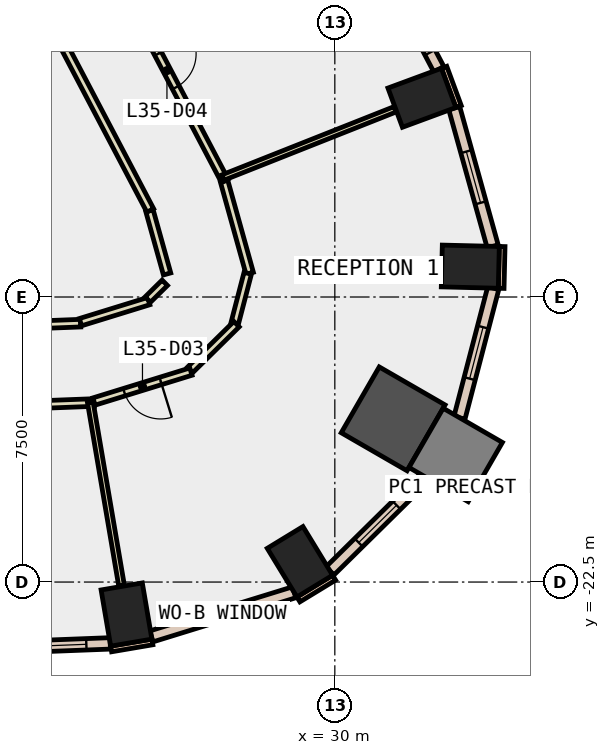
"""IFC4 building model, lengths in metres.
Left out: names, types, materials, properties, quantities, classifications, styles, units other than length and angle.
Written with IfcOpenShell. Run it as: python <this file> out.ifc"""

import sys

from ifc_helpers import new_model, si_unit, direction, frame, frame_2d, origin, origin_2d, place, context, subcontext, project, spatial, rectangle, extrude, element, fill, save


model = new_model("IFC4")
c1 = context("Model", 3, precision=1e-05, world=origin(), true_north=direction((0.0, 1.0)))
c2 = subcontext(c1, "Body", "Model", "MODEL_VIEW")
j1 = project(units=[si_unit("LENGTHUNIT", "METRE"), si_unit("PLANEANGLEUNIT", "RADIAN")], contexts=[c1])
p1 = place(None, origin())
s1 = spatial("IfcSite", under=j1, at=p1, CompositionType="ELEMENT")
p2 = place(p1, origin())
s2 = spatial("IfcBuilding", under=s1, at=p2, CompositionType="ELEMENT")
p3 = place(p2, frame((0.0, 0.0, 159.2)))
s3 = spatial("IfcBuildingStorey", under=s2, at=p3, CompositionType="ELEMENT", Elevation=159.2)
for number, where, z_axis, x_axis in (
    (1, (24.518, -23.355, -0.4), (0.0, 0.0, 1.0), (0.986, 0.168, 0.0)),
    (2, (29.082, -21.967, -0.4), (0.0, 0.0, 1.0), (0.854, 0.521, 0.0)),
):
    element("IfcColumn", number, at=place(p3, frame(where, z_axis=z_axis, x_axis=x_axis)), inside=s3, PredefinedType="COLUMN", context=c2, shape_type="SweptSolid", body=[
        extrude(rectangle(XDim=1.1, YDim=1.5, at=origin_2d()), origin(), (0.0, 0.0, 1.0), 4.2),
    ])
p4 = place(p3, frame((31.535, -18.206, -0.4), z_axis=(0.0, 0.0, 1.0), x_axis=(-0.866025403784, 0.5, 0.0)))
e3 = element("IfcColumn", 3, at=p4, inside=s3, PredefinedType="COLUMN", context=c2, shape_type="SweptSolid", body=[
    extrude(rectangle(XDim=2.0, YDim=2.0, at=origin_2d()), origin(), (0.0, 0.0, 1.0), 4.2),
])
for number, where, z_axis, x_axis in (
    (4, (33.565, -14.202, -0.4), (0.0, 0.0, 1.0), (0.024, 1.0, 0.0)),
    (5, (32.292, -9.758, -0.4), (0.0, 0.0, 1.0), (-0.347, 0.938, 0.0)),
):
    element("IfcColumn", number, at=place(p3, frame(where, z_axis=z_axis, x_axis=x_axis)), inside=s3, PredefinedType="COLUMN", context=c2, shape_type="SweptSolid", body=[
        extrude(rectangle(XDim=1.1, YDim=1.5, at=origin_2d()), origin(), (0.0, 0.0, 1.0), 4.2),
    ])
p5 = place(p3, frame((33.18, -19.156, -0.4), z_axis=(0.0, 0.0, 1.0), x_axis=(-0.866025403784, 0.5, 0.0)))
e6 = element("IfcColumn", 6, at=p5, inside=s3, PredefinedType="COLUMN", context=c2, shape_type="SweptSolid", body=[
    extrude(rectangle(XDim=1.8, YDim=1.8, at=origin_2d()), origin(), (0.0, 0.0, 1.0), 4.2),
])
p6 = place(p3, frame((33.256, -9.988, 0.0), z_axis=(0.0, 0.0, 1.0), x_axis=(-0.346425160624, 0.93807761304, 0.0)))
e7 = element("IfcWall", 7, at=p6, inside=s3, PredefinedType="STANDARD", context=c2, shape_type="SweptSolid", body=[
    extrude(rectangle(XDim=1.1, YDim=0.15, at=frame_2d((0.55, 0.0))), origin(), (0.0, 0.0, 1.0), 3.8),
])
p7 = place(p3, frame((24.114, -24.261, 0.0), z_axis=(0.0, 0.0, 1.0), x_axis=(0.985763338892, 0.168138751323, 0.0)))
e8 = element("IfcWall", 8, at=p7, inside=s3, PredefinedType="STANDARD", context=c2, shape_type="SweptSolid", body=[
    extrude(rectangle(XDim=1.101, YDim=0.15, at=frame_2d((0.55, 0.0))), origin(), (0.0, 0.0, 1.0), 3.8),
])
p8 = place(p3, frame((29.042, -22.957, 0.0), z_axis=(0.0, 0.0, 1.0), x_axis=(0.854005542721, 0.520263907071, 0.0)))
e9 = element("IfcWall", 9, at=p8, inside=s3, PredefinedType="STANDARD", context=c2, shape_type="SweptSolid", body=[
    extrude(rectangle(XDim=1.099, YDim=0.15, at=frame_2d((0.55, 0.0))), origin(), (0.0, 0.0, 1.0), 3.8),
])
p9 = place(p3, frame((34.377, -14.772, 0.0), z_axis=(0.0, 0.0, 1.0), x_axis=(0.023744690764, 0.999718055084, 0.0)))
e10 = element("IfcWall", 10, at=p9, inside=s3, PredefinedType="STANDARD", context=c2, shape_type="SweptSolid", body=[
    extrude(rectangle(XDim=1.1, YDim=0.15, at=frame_2d((0.55, 0.0))), origin(), (0.0, 0.0, 1.0), 3.8),
])
p10 = place(p3, frame((16.778, -24.395, 0.0), z_axis=(0.0, 0.0, 1.0), x_axis=(0.999262356942, 0.038402369711, 0.0)))
e11 = element("IfcWall", 11, at=p10, inside=s3, PredefinedType="STANDARD", context=c2, shape_type="SweptSolid", body=[
    extrude(rectangle(XDim=7.317, YDim=0.3, at=frame_2d((3.659, 0.0))), origin(), (0.0, 0.0, 1.0), 3.8),
])
p11 = place(p10, frame((0.629, 0.0, 0.9)))
e12 = element("IfcOpeningElement", 12, at=p11, cuts=e11, PredefinedType="OPENING", context=c2, shape_type="SweptSolid", body=[
    extrude(rectangle(XDim=2.4, YDim=2.6, at=frame_2d((1.2, 1.3))), frame((0.0, 0.16, 0.0), z_axis=(0.0, -1.0, 0.0), x_axis=(1.0, 0.0, 0.0)), (0.0, 0.0, 1.0), 0.32),
])
p12 = place(p10, frame((4.288, 0.0, 0.9)))
e13 = element("IfcOpeningElement", 13, at=p12, cuts=e11, PredefinedType="OPENING", context=c2, shape_type="SweptSolid", body=[
    extrude(rectangle(XDim=2.4, YDim=2.6, at=frame_2d((1.2, 1.3))), frame((0.0, 0.16, 0.0), z_axis=(0.0, -1.0, 0.0), x_axis=(1.0, 0.0, 0.0)), (0.0, 0.0, 1.0), 0.32),
])
p13 = place(p3, frame((25.173, -23.93, 0.0), z_axis=(0.0, 0.0, 1.0), x_axis=(0.955473661147, 0.295076401723, 0.0)))
e14 = element("IfcWall", 14, at=p13, inside=s3, PredefinedType="STANDARD", context=c2, shape_type="SweptSolid", body=[
    extrude(rectangle(XDim=3.931, YDim=0.3, at=frame_2d((1.965, 0.0))), origin(), (0.0, 0.0, 1.0), 3.8),
])
p14 = place(p13, frame((1.266, 0.0, 0.9)))
e15 = element("IfcOpeningElement", 15, at=p14, cuts=e14, PredefinedType="OPENING", context=c2, shape_type="SweptSolid", body=[
    extrude(rectangle(XDim=1.4, YDim=2.6, at=frame_2d((0.7, 1.3))), frame((0.0, 0.16, 0.0), z_axis=(0.0, -1.0, 0.0), x_axis=(1.0, 0.0, 0.0)), (0.0, 0.0, 1.0), 0.32),
])
p15 = place(p3, frame((29.872, -22.207, 0.0), z_axis=(0.0, 0.0, 1.0), x_axis=(0.712043314899, 0.702135540838, 0.0)))
e16 = element("IfcWall", 16, at=p15, inside=s3, PredefinedType="STANDARD", context=c2, shape_type="SweptSolid", body=[
    extrude(rectangle(XDim=3.524, YDim=0.3, at=frame_2d((1.762, 0.0))), origin(), (0.0, 0.0, 1.0), 3.8),
])
p16 = place(p15, frame((1.062, 0.0, 0.9)))
e17 = element("IfcOpeningElement", 17, at=p16, cuts=e16, PredefinedType="OPENING", context=c2, shape_type="SweptSolid", body=[
    extrude(rectangle(XDim=1.4, YDim=2.6, at=frame_2d((0.7, 1.3))), frame((0.0, 0.16, 0.0), z_axis=(0.0, -1.0, 0.0), x_axis=(1.0, 0.0, 0.0)), (0.0, 0.0, 1.0), 0.32),
])
p17 = place(p3, frame((33.28, -18.176, 0.0), z_axis=(0.0, 0.0, 1.0), x_axis=(0.252255494168, 0.967660666588, 0.0)))
e18 = element("IfcWall", 18, at=p17, inside=s3, PredefinedType="STANDARD", context=c2, shape_type="SweptSolid", body=[
    extrude(rectangle(XDim=3.524, YDim=0.3, at=frame_2d((1.762, 0.0))), origin(), (0.0, 0.0, 1.0), 3.8),
])
p18 = place(p17, frame((1.062, 0.0, 0.9)))
e19 = element("IfcOpeningElement", 19, at=p18, cuts=e18, PredefinedType="OPENING", context=c2, shape_type="SweptSolid", body=[
    extrude(rectangle(XDim=1.4, YDim=2.6, at=frame_2d((0.7, 1.3))), frame((0.0, 0.16, 0.0), z_axis=(0.0, -1.0, 0.0), x_axis=(1.0, 0.0, 0.0)), (0.0, 0.0, 1.0), 0.32),
])
p19 = place(p3, frame((34.154, -13.667, 0.0), z_axis=(0.0, 0.0, 1.0), x_axis=(-0.26799398221, 0.963420585985, 0.0)))
e20 = element("IfcWall", 20, at=p19, inside=s3, PredefinedType="STANDARD", context=c2, shape_type="SweptSolid", body=[
    extrude(rectangle(XDim=3.776, YDim=0.3, at=frame_2d((1.888, 0.0))), origin(), (0.0, 0.0, 1.0), 3.8),
])
p20 = place(p19, frame((1.188, 0.0, 0.9)))
e21 = element("IfcOpeningElement", 21, at=p20, cuts=e20, PredefinedType="OPENING", context=c2, shape_type="SweptSolid", body=[
    extrude(rectangle(XDim=1.4, YDim=2.6, at=frame_2d((0.7, 1.3))), frame((0.0, 0.16, 0.0), z_axis=(0.0, -1.0, 0.0), x_axis=(1.0, 0.0, 0.0)), (0.0, 0.0, 1.0), 0.32),
])
p21 = place(p3, frame((32.737, -9.008, 0.0), z_axis=(0.0, 0.0, 1.0), x_axis=(-0.465104650407, 0.885255705528, 0.0)))
e22 = element("IfcWall", 22, at=p21, inside=s3, PredefinedType="STANDARD", context=c2, shape_type="SweptSolid", body=[
    extrude(rectangle(XDim=5.99, YDim=0.3, at=frame_2d((2.995, 0.0))), origin(), (0.0, 0.0, 1.0), 3.8),
])
p22 = place(p21, frame((0.498, 0.0, 0.9)))
e23 = element("IfcOpeningElement", 23, at=p22, cuts=e22, PredefinedType="OPENING", context=c2, shape_type="SweptSolid", body=[
    extrude(rectangle(XDim=2.0, YDim=2.6, at=frame_2d((1.0, 1.3))), frame((0.0, 0.16, 0.0), z_axis=(0.0, -1.0, 0.0), x_axis=(1.0, 0.0, 0.0)), (0.0, 0.0, 1.0), 0.32),
])
p23 = place(p21, frame((3.493, 0.0, 0.9)))
e24 = element("IfcOpeningElement", 24, at=p23, cuts=e22, PredefinedType="OPENING", context=c2, shape_type="SweptSolid", body=[
    extrude(rectangle(XDim=2.0, YDim=2.6, at=frame_2d((1.0, 1.3))), frame((0.0, 0.16, 0.0), z_axis=(0.0, -1.0, 0.0), x_axis=(1.0, 0.0, 0.0)), (0.0, 0.0, 1.0), 0.32),
])
p24 = place(p3, frame((15.972, -15.97, 0.0), z_axis=(0.0, 0.0, 1.0), x_axis=(0.999262695969, 0.038393546916, 0.0)))
e25 = element("IfcWall", 25, at=p24, inside=s3, PredefinedType="PARTITIONING", context=c2, shape_type="SweptSolid", body=[
    extrude(rectangle(XDim=7.344, YDim=0.2, at=frame_2d((3.672, 0.0))), origin(), (0.0, 0.0, 1.0), 3.8),
])
p25 = place(p3, frame((23.307, -15.662, 0.0), z_axis=(0.0, 0.0, 1.0), x_axis=(0.955548436851, 0.294834164966, 0.0)))
e26 = element("IfcWall", 26, at=p25, inside=s3, PredefinedType="PARTITIONING", context=c2, shape_type="SweptSolid", body=[
    extrude(rectangle(XDim=1.88, YDim=0.2, at=frame_2d((0.94, 0.0))), origin(), (0.0, 0.0, 1.0), 3.8),
])
p26 = place(p3, frame((25.079, -15.067, 0.0), z_axis=(0.0, 0.0, 1.0), x_axis=(0.711758647644, 0.702424108003, 0.0)))
e27 = element("IfcWall", 27, at=p26, inside=s3, PredefinedType="PARTITIONING", context=c2, shape_type="SweptSolid", body=[
    extrude(rectangle(XDim=0.628, YDim=0.2, at=frame_2d((0.314, 0.0))), origin(), (0.0, 0.0, 1.0), 3.8),
])
p27 = place(p3, frame((25.586, -14.393, 0.0), z_axis=(0.0, 0.0, 1.0), x_axis=(-0.268139825244, 0.963380005044, 0.0)))
e28 = element("IfcWall", 28, at=p27, inside=s3, PredefinedType="PARTITIONING", context=c2, shape_type="SweptSolid", body=[
    extrude(rectangle(XDim=1.726, YDim=0.2, at=frame_2d((0.863, 0.0))), origin(), (0.0, 0.0, 1.0), 3.8),
])
p28 = place(p3, frame((25.143, -12.722, 0.0), z_axis=(0.0, 0.0, 1.0), x_axis=(-0.465089990515, 0.885263407536, 0.0)))
e29 = element("IfcWall", 29, at=p28, inside=s3, PredefinedType="PARTITIONING", context=c2, shape_type="SweptSolid", body=[
    extrude(rectangle(XDim=6.24, YDim=0.2, at=frame_2d((3.12, 0.0))), origin(), (0.0, 0.0, 1.0), 3.8),
])
p29 = place(p3, frame((23.667, -17.776, 0.0), z_axis=(0.0, 0.0, 1.0), x_axis=(-0.999264080977, -0.038357482575, 0.0)))
e30 = element("IfcWall", 30, at=p29, inside=s3, PredefinedType="PARTITIONING", context=c2, shape_type="SweptSolid", body=[
    extrude(rectangle(XDim=7.562, YDim=0.2, at=frame_2d((3.781, 0.0))), origin(), (0.0, 0.0, 1.0), 3.8),
])
p30 = place(p29, frame((3.356, 0.0, 0.0)))
e31 = element("IfcOpeningElement", 31, at=p30, cuts=e30, PredefinedType="OPENING", context=c2, shape_type="SweptSolid", body=[
    extrude(rectangle(XDim=1.0, YDim=2.1, at=frame_2d((0.5, 1.05))), frame((0.0, 0.11, 0.0), z_axis=(0.0, -1.0, 0.0), x_axis=(1.0, 0.0, 0.0)), (0.0, 0.0, 1.0), 0.22),
])
p31 = place(p3, frame((27.086, -11.952, 0.0), z_axis=(0.0, 0.0, 1.0), x_axis=(0.267909096687, -0.963444194498, 0.0)))
e32 = element("IfcWall", 32, at=p31, inside=s3, PredefinedType="PARTITIONING", context=c2, shape_type="SweptSolid", body=[
    extrude(rectangle(XDim=2.516, YDim=0.2, at=frame_2d((1.258, 0.0))), origin(), (0.0, 0.0, 1.0), 3.8),
])
p32 = place(p3, frame((27.708, -14.376, 0.0), z_axis=(0.0, 0.0, 1.0), x_axis=(-0.25159336549, -0.967833032316, 0.0)))
e33 = element("IfcWall", 33, at=p32, inside=s3, PredefinedType="PARTITIONING", context=c2, shape_type="SweptSolid", body=[
    extrude(rectangle(XDim=1.356, YDim=0.2, at=frame_2d((0.678, 0.0))), origin(), (0.0, 0.0, 1.0), 3.8),
])
p33 = place(p3, frame((27.413, -15.715, 0.0), z_axis=(0.0, 0.0, 1.0), x_axis=(-0.712339678389, -0.701834868465, 0.0)))
e34 = element("IfcWall", 34, at=p33, inside=s3, PredefinedType="PARTITIONING", context=c2, shape_type="SweptSolid", body=[
    extrude(rectangle(XDim=1.72, YDim=0.2, at=frame_2d((0.86, 0.0))), origin(), (0.0, 0.0, 1.0), 3.8),
])
p34 = place(p3, frame((26.213, -16.963, 0.0), z_axis=(0.0, 0.0, 1.0), x_axis=(-0.955509582123, -0.294960062501, 0.0)))
e35 = element("IfcWall", 35, at=p34, inside=s3, PredefinedType="PARTITIONING", context=c2, shape_type="SweptSolid", body=[
    extrude(rectangle(XDim=2.668, YDim=0.2, at=frame_2d((1.334, 0.0))), origin(), (0.0, 0.0, 1.0), 3.8),
])
p35 = place(p34, frame((0.834, 0.0, 0.0)))
e36 = element("IfcOpeningElement", 36, at=p35, cuts=e35, PredefinedType="OPENING", context=c2, shape_type="SweptSolid", body=[
    extrude(rectangle(XDim=1.0, YDim=2.1, at=frame_2d((0.5, 1.05))), frame((0.0, 0.11, 0.0), z_axis=(0.0, -1.0, 0.0), x_axis=(1.0, 0.0, 0.0)), (0.0, 0.0, 1.0), 0.22),
])
p36 = place(p3, frame((24.059, -6.143, 0.0), z_axis=(0.0, 0.0, 1.0), x_axis=(0.464993808059, -0.885313932154, 0.0)))
e37 = element("IfcWall", 37, at=p36, inside=s3, PredefinedType="PARTITIONING", context=c2, shape_type="SweptSolid", body=[
    extrude(rectangle(XDim=6.552, YDim=0.2, at=frame_2d((3.276, 0.0))), origin(), (0.0, 0.0, 1.0), 3.8),
])
p37 = place(p36, frame((2.776, 0.0, 0.0)))
e38 = element("IfcOpeningElement", 38, at=p37, cuts=e37, PredefinedType="OPENING", context=c2, shape_type="SweptSolid", body=[
    extrude(rectangle(XDim=1.0, YDim=2.1, at=frame_2d((0.5, 1.05))), frame((0.0, 0.11, 0.0), z_axis=(0.0, -1.0, 0.0), x_axis=(1.0, 0.0, 0.0)), (0.0, 0.0, 1.0), 0.22),
])
p38 = place(p3, frame((23.567, -17.779, 0.0), z_axis=(0.0, 0.0, 1.0), x_axis=(0.168027663896, -0.985782280306, 0.0)))
e39 = element("IfcWall", 39, at=p38, inside=s3, PredefinedType="PARTITIONING", context=c2, shape_type="SweptSolid", body=[
    extrude(rectangle(XDim=4.886, YDim=0.15, at=frame_2d((2.443, 0.0))), origin(), (0.0, 0.0, 1.0), 3.8),
])
p39 = place(p3, frame((27.059, -11.855, 0.0), z_axis=(0.0, 0.0, 1.0), x_axis=(0.92964843089, 0.368447818481, 0.0)))
e40 = element("IfcWall", 40, at=p39, inside=s3, PredefinedType="PARTITIONING", context=c2, shape_type="SweptSolid", body=[
    extrude(rectangle(XDim=4.866, YDim=0.15, at=frame_2d((2.433, 0.0))), origin(), (0.0, 0.0, 1.0), 3.8),
])
p40 = place(p12, origin())
e41 = element("IfcWindow", 41, at=p40, inside=s3, PartitioningType="SINGLE_PANEL", PredefinedType="WINDOW", context=c2, shape_type="SweptSolid", body=[
    extrude(rectangle(XDim=2.4, YDim=2.6, at=frame_2d((1.2, 1.3))), frame((0.0, 0.03, 0.0), z_axis=(0.0, -1.0, 0.0), x_axis=(1.0, 0.0, 0.0)), (0.0, 0.0, 1.0), 0.06),
])
fill(e13, e41)
p41 = place(p14, origin())
e42 = element("IfcWindow", 42, at=p41, inside=s3, PartitioningType="SINGLE_PANEL", PredefinedType="WINDOW", context=c2, shape_type="SweptSolid", body=[
    extrude(rectangle(XDim=1.4, YDim=2.6, at=frame_2d((0.7, 1.3))), frame((0.0, 0.03, 0.0), z_axis=(0.0, -1.0, 0.0), x_axis=(1.0, 0.0, 0.0)), (0.0, 0.0, 1.0), 0.06),
])
fill(e15, e42)
p42 = place(p16, origin())
e43 = element("IfcWindow", 43, at=p42, inside=s3, PartitioningType="SINGLE_PANEL", PredefinedType="WINDOW", context=c2, shape_type="SweptSolid", body=[
    extrude(rectangle(XDim=1.4, YDim=2.6, at=frame_2d((0.7, 1.3))), frame((0.0, 0.03, 0.0), z_axis=(0.0, -1.0, 0.0), x_axis=(1.0, 0.0, 0.0)), (0.0, 0.0, 1.0), 0.06),
])
fill(e17, e43)
p43 = place(p18, origin())
e44 = element("IfcWindow", 44, at=p43, inside=s3, PartitioningType="SINGLE_PANEL", PredefinedType="WINDOW", context=c2, shape_type="SweptSolid", body=[
    extrude(rectangle(XDim=1.4, YDim=2.6, at=frame_2d((0.7, 1.3))), frame((0.0, 0.03, 0.0), z_axis=(0.0, -1.0, 0.0), x_axis=(1.0, 0.0, 0.0)), (0.0, 0.0, 1.0), 0.06),
])
fill(e19, e44)
p44 = place(p20, origin())
e45 = element("IfcWindow", 45, at=p44, inside=s3, PartitioningType="SINGLE_PANEL", PredefinedType="WINDOW", context=c2, shape_type="SweptSolid", body=[
    extrude(rectangle(XDim=1.4, YDim=2.6, at=frame_2d((0.7, 1.3))), frame((0.0, 0.03, 0.0), z_axis=(0.0, -1.0, 0.0), x_axis=(1.0, 0.0, 0.0)), (0.0, 0.0, 1.0), 0.06),
])
fill(e21, e45)
p45 = place(p22, origin())
e46 = element("IfcWindow", 46, at=p45, inside=s3, PartitioningType="SINGLE_PANEL", PredefinedType="WINDOW", context=c2, shape_type="SweptSolid", body=[
    extrude(rectangle(XDim=2.0, YDim=2.6, at=frame_2d((1.0, 1.3))), frame((0.0, 0.03, 0.0), z_axis=(0.0, -1.0, 0.0), x_axis=(1.0, 0.0, 0.0)), (0.0, 0.0, 1.0), 0.06),
])
fill(e23, e46)
p46 = place(p35, origin())
e47 = element("IfcDoor", 47, at=p46, inside=s3, OperationType="SINGLE_SWING_LEFT", PredefinedType="DOOR", context=c2, shape_type="SweptSolid", body=[
    extrude(rectangle(XDim=1.0, YDim=2.1, at=frame_2d((0.5, 1.05))), frame((0.0, 0.025, 0.0), z_axis=(0.0, -1.0, 0.0), x_axis=(1.0, 0.0, 0.0)), (0.0, 0.0, 1.0), 0.05),
])
fill(e36, e47)
p47 = place(p37, origin())
e48 = element("IfcDoor", 48, at=p47, inside=s3, OperationType="SINGLE_SWING_LEFT", PredefinedType="DOOR", context=c2, shape_type="SweptSolid", body=[
    extrude(rectangle(XDim=1.0, YDim=2.1, at=frame_2d((0.5, 1.05))), frame((0.0, 0.025, 0.0), z_axis=(0.0, -1.0, 0.0), x_axis=(1.0, 0.0, 0.0)), (0.0, 0.0, 1.0), 0.05),
])
fill(e38, e48)
save(model, sys.argv[1])
